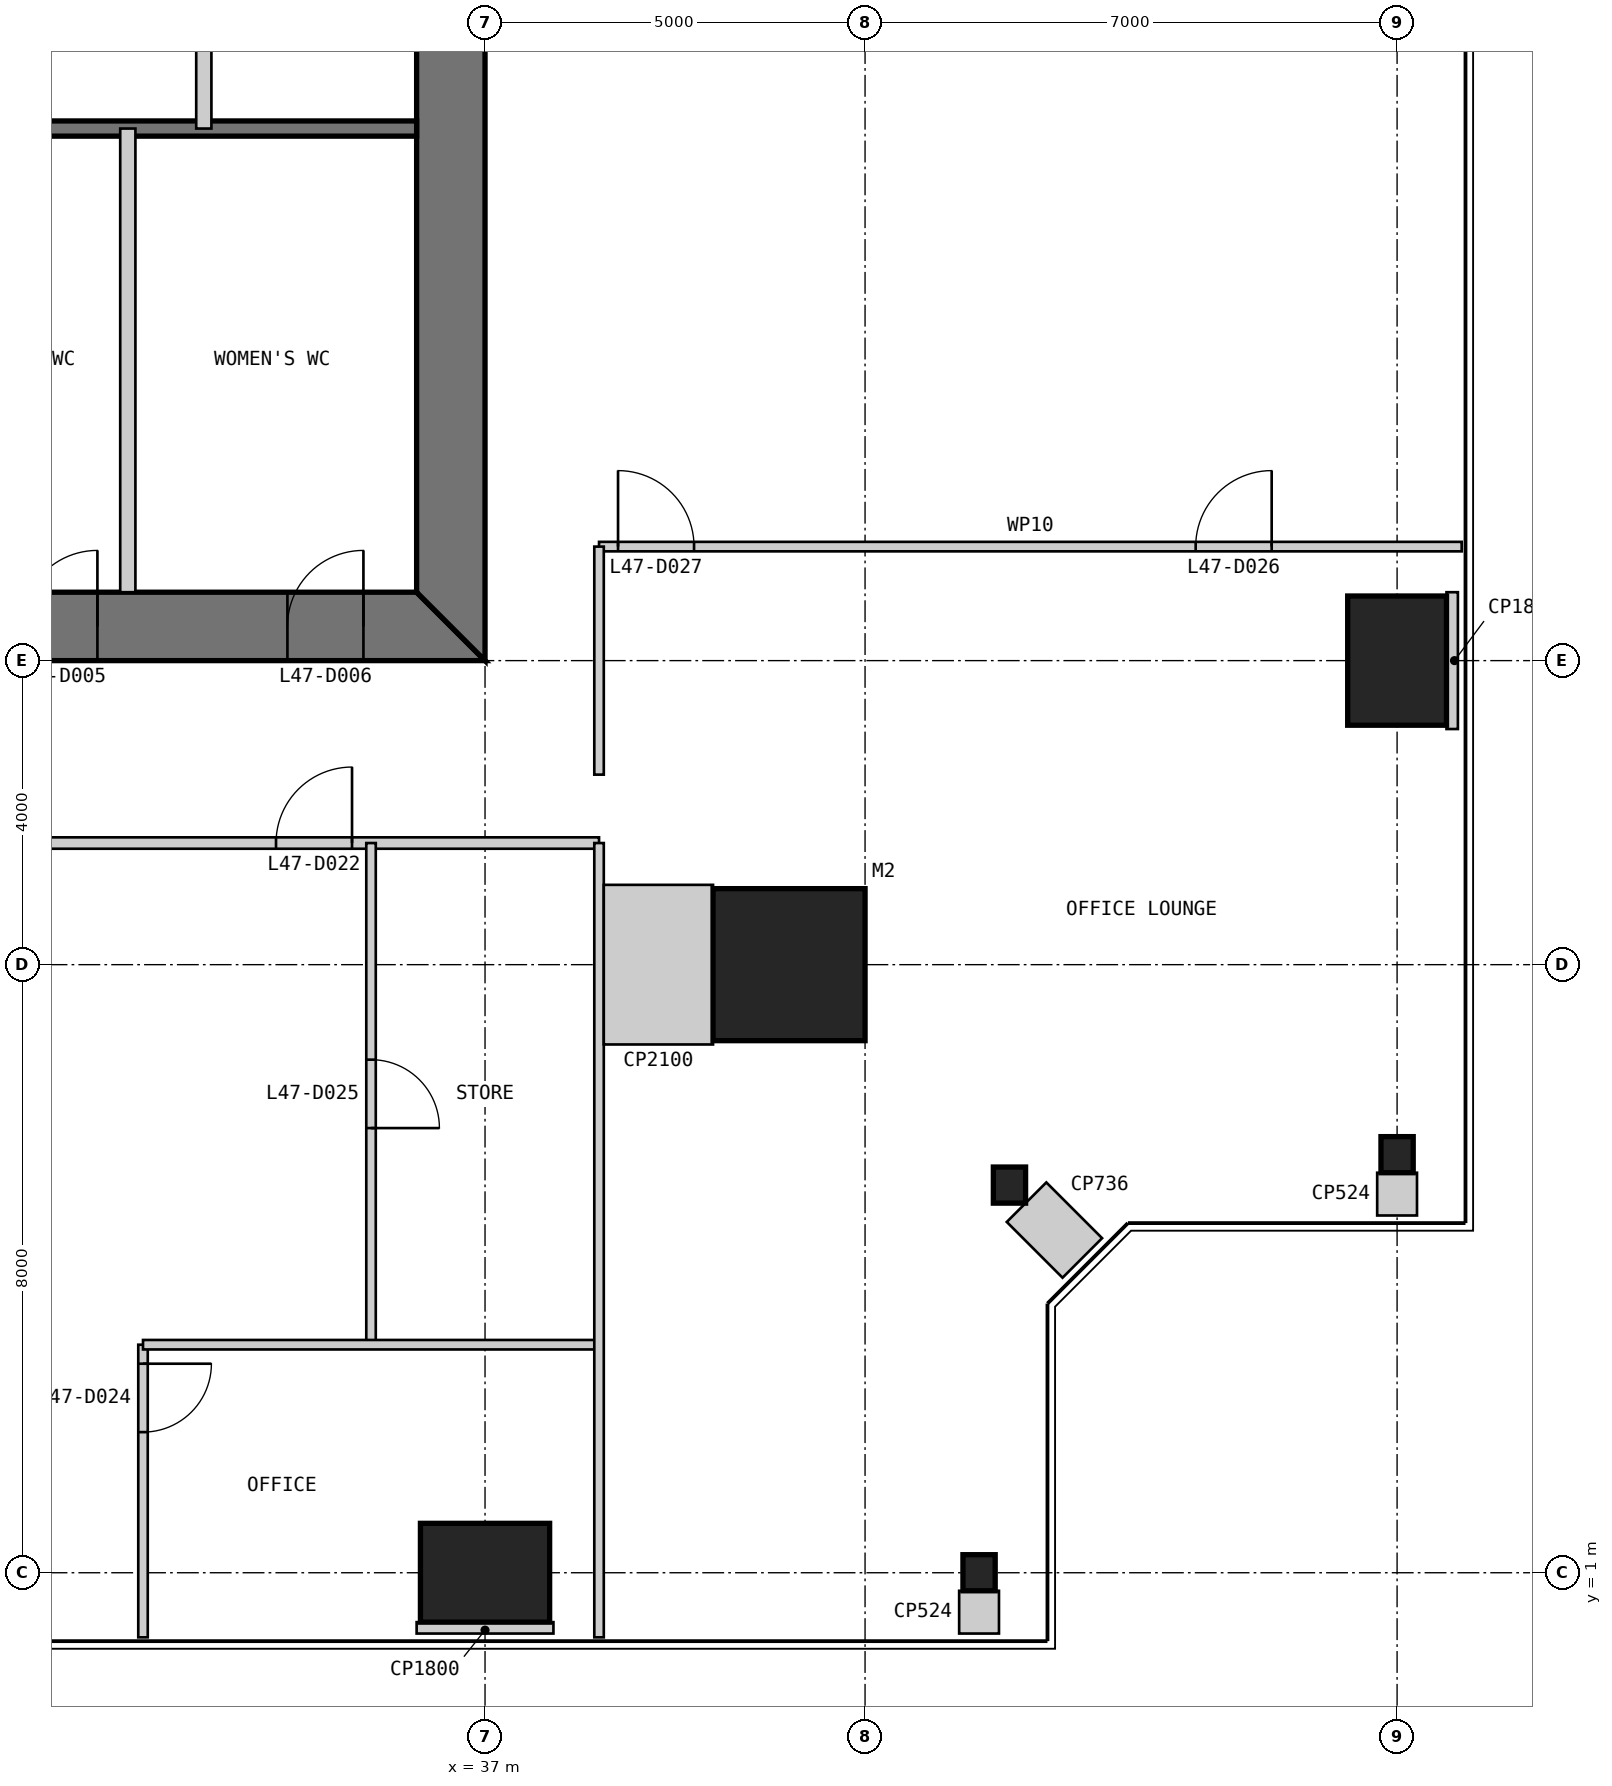
"""IFC4 building model, lengths in metres.
Left out: names, types, materials, properties, quantities, classifications, styles, units other than length and angle.
Written with IfcOpenShell. Run it as: python <this file> out.ifc"""

import sys

from ifc_helpers import new_model, si_unit, direction, frame, frame_2d, origin, origin_2d, place, context, subcontext, project, spatial, polyline, rectangle, i_section, outline, extrude, element, fill, save


model = new_model("IFC4")
c1 = context("Model", 3, precision=1e-05, world=origin(), true_north=direction((0.0, 1.0)))
c2 = subcontext(c1, "Body", "Model", "MODEL_VIEW")
j1 = project(units=[si_unit("LENGTHUNIT", "METRE"), si_unit("PLANEANGLEUNIT", "RADIAN")], contexts=[c1])
p1 = place(None, origin())
s1 = spatial("IfcSite", under=j1, at=p1, CompositionType="ELEMENT")
p2 = place(p1, origin())
s2 = spatial("IfcBuilding", under=s1, at=p2, CompositionType="ELEMENT")
p3 = place(p2, frame((0.0, 0.0, 201.8)))
s3 = spatial("IfcBuildingStorey", under=s2, at=p3, CompositionType="ELEMENT", Elevation=201.8)
p4 = place(p3, frame((41.0, 9.0, 0.0), z_axis=(0.0, 0.0, 1.0), x_axis=(1.0, 0.0, 0.0)))
e1 = element("IfcColumn", 1, at=p4, inside=s3, PredefinedType="COLUMN", context=c2, shape_type="SweptSolid", body=[
    extrude(rectangle(XDim=2.0, YDim=2.0, at=origin_2d()), origin(), (0.0, 0.0, 1.0), 4.0),
])
p5 = place(p3, frame((37.0, 1.0, 0.0), z_axis=(0.0, 0.0, 1.0), x_axis=(1.0, 0.0, 0.0)))
e2 = element("IfcColumn", 2, at=p5, inside=s3, PredefinedType="COLUMN", context=c2, shape_type="SweptSolid", body=[
    extrude(rectangle(XDim=1.7, YDim=1.3, at=origin_2d()), origin(), (0.0, 0.0, 1.0), 4.0),
])
for number, where, z_axis, x_axis in (
    (3, (43.5, 1.0, 0.0), (0.0, 0.0, 1.0), (1.0, 0.0, 0.0)),
    (4, (43.9, 6.1, 0.0), (0.0, 0.0, 1.0), (1.0, 0.0, 0.0)),
    (5, (49.0, 6.5, 0.0), (0.0, 0.0, 1.0), (1.0, 0.0, 0.0)),
):
    element("IfcColumn", number, at=place(p3, frame(where, z_axis=z_axis, x_axis=x_axis)), inside=s3, PredefinedType="COLUMN", context=c2, shape_type="SweptSolid", body=[
        extrude(i_section(OverallWidth=0.424, OverallDepth=0.475, WebThickness=0.048, FlangeThickness=0.077, at=origin_2d()), origin(), (0.0, 0.0, 1.0), 4.0),
    ])
p6 = place(p3, frame((49.0, 13.0, 0.0), z_axis=(0.0, 0.0, 1.0), x_axis=(1.0, 0.0, 0.0)))
e6 = element("IfcColumn", 6, at=p6, inside=s3, PredefinedType="COLUMN", context=c2, shape_type="SweptSolid", body=[
    extrude(rectangle(XDim=1.3, YDim=1.7, at=origin_2d()), origin(), (0.0, 0.0, 1.0), 4.0),
])
p7 = place(p3, frame((13.0, 13.45, 0.0), z_axis=(0.0, 0.0, 1.0), x_axis=(1.0, 0.0, 0.0)))
e7 = element("IfcWall", 7, at=p7, inside=s3, PredefinedType="SHEAR", context=c2, shape_type="SweptSolid", body=[
    extrude(outline(polyline([(0.0, -0.45), (24.0, -0.45), (23.1, 0.45), (0.9, 0.45), (0.0, -0.45)])), origin(), (0.0, 0.0, 1.0), 4.0),
])
p8 = place(p7, frame((4.9, 0.0, 0.0)))
e8 = element("IfcOpeningElement", 8, at=p8, cuts=e7, PredefinedType="OPENING", context=c2, shape_type="SweptSolid", body=[
    extrude(rectangle(XDim=1.0, YDim=2.2, at=frame_2d((0.5, 1.1))), frame((0.0, 0.46, 0.0), z_axis=(0.0, -1.0, 0.0), x_axis=(1.0, 0.0, 0.0)), (0.0, 0.0, 1.0), 0.92),
])
p9 = place(p7, frame((8.9, 0.0, 0.0)))
e9 = element("IfcOpeningElement", 9, at=p9, cuts=e7, PredefinedType="OPENING", context=c2, shape_type="SweptSolid", body=[
    extrude(rectangle(XDim=1.1, YDim=2.2, at=frame_2d((0.55, 1.1))), frame((0.0, 0.46, 0.0), z_axis=(0.0, -1.0, 0.0), x_axis=(1.0, 0.0, 0.0)), (0.0, 0.0, 1.0), 0.92),
])
p10 = place(p7, frame((15.05, 0.0, 0.0)))
e10 = element("IfcOpeningElement", 10, at=p10, cuts=e7, PredefinedType="OPENING", context=c2, shape_type="SweptSolid", body=[
    extrude(rectangle(XDim=0.9, YDim=2.2, at=frame_2d((0.45, 1.1))), frame((0.0, 0.46, 0.0), z_axis=(0.0, -1.0, 0.0), x_axis=(1.0, 0.0, 0.0)), (0.0, 0.0, 1.0), 0.92),
])
p11 = place(p7, frame((17.9, 0.0, 0.0)))
e11 = element("IfcOpeningElement", 11, at=p11, cuts=e7, PredefinedType="OPENING", context=c2, shape_type="SweptSolid", body=[
    extrude(rectangle(XDim=1.0, YDim=2.2, at=frame_2d((0.5, 1.1))), frame((0.0, 0.46, 0.0), z_axis=(0.0, -1.0, 0.0), x_axis=(1.0, 0.0, 0.0)), (0.0, 0.0, 1.0), 0.92),
])
p12 = place(p7, frame((21.4, 0.0, 0.0)))
e12 = element("IfcOpeningElement", 12, at=p12, cuts=e7, PredefinedType="OPENING", context=c2, shape_type="SweptSolid", body=[
    extrude(rectangle(XDim=1.0, YDim=2.2, at=frame_2d((0.5, 1.1))), frame((0.0, 0.46, 0.0), z_axis=(0.0, -1.0, 0.0), x_axis=(1.0, 0.0, 0.0)), (0.0, 0.0, 1.0), 0.92),
])
p13 = place(p3, frame((36.55, 13.9, 0.0), z_axis=(0.0, 0.0, 1.0), x_axis=(0.0, 1.0, 0.0)))
e13 = element("IfcWall", 13, at=p13, inside=s3, PredefinedType="SHEAR", context=c2, shape_type="SweptSolid", body=[
    extrude(outline(polyline([(-0.9, -0.45), (23.1, -0.45), (22.2, 0.45), (0.0, 0.45), (-0.9, -0.45)])), origin(), (0.0, 0.0, 1.0), 4.0),
])
p14 = place(p13, frame((20.2, 0.0, 0.0)))
e14 = element("IfcOpeningElement", 14, at=p14, cuts=e13, PredefinedType="OPENING", context=c2, shape_type="SweptSolid", body=[
    extrude(rectangle(XDim=1.0, YDim=2.2, at=frame_2d((0.5, 1.1))), frame((0.0, 0.46, 0.0), z_axis=(0.0, -1.0, 0.0), x_axis=(1.0, 0.0, 0.0)), (0.0, 0.0, 1.0), 0.92),
])
p15 = place(p13, frame((17.25, 0.0, 0.0)))
e15 = element("IfcOpeningElement", 15, at=p15, cuts=e13, PredefinedType="OPENING", context=c2, shape_type="SweptSolid", body=[
    extrude(rectangle(XDim=0.9, YDim=2.2, at=frame_2d((0.45, 1.1))), frame((0.0, 0.46, 0.0), z_axis=(0.0, -1.0, 0.0), x_axis=(1.0, 0.0, 0.0)), (0.0, 0.0, 1.0), 0.92),
])
p16 = place(p3, frame((20.3, 20.0, 0.0), z_axis=(0.0, 0.0, 1.0), x_axis=(1.0, 0.0, 0.0)))
e16 = element("IfcWall", 16, at=p16, inside=s3, PredefinedType="SOLIDWALL", context=c2, shape_type="SweptSolid", body=[
    extrude(rectangle(XDim=15.8, YDim=0.2, at=frame_2d((7.9, 0.0))), origin(), (0.0, 0.0, 1.0), 3.8),
])
p17 = place(p3, frame((32.3, 13.9, 0.0), z_axis=(0.0, 0.0, 1.0), x_axis=(0.0, 1.0, 0.0)))
e17 = element("IfcWall", 17, at=p17, inside=s3, PredefinedType="PARTITIONING", context=c2, shape_type="SweptSolid", body=[
    extrude(rectangle(XDim=6.1, YDim=0.2, at=frame_2d((3.05, 0.0))), origin(), (0.0, 0.0, 1.0), 3.8),
])
p18 = place(p3, frame((33.3, 36.1, 0.0), z_axis=(0.0, 0.0, 1.0), x_axis=(0.0, -1.0, 0.0)))
e18 = element("IfcWall", 18, at=p18, inside=s3, PredefinedType="PARTITIONING", context=c2, shape_type="SweptSolid", body=[
    extrude(rectangle(XDim=16.1, YDim=0.2, at=frame_2d((8.05, 0.0))), origin(), (0.0, 0.0, 1.0), 3.8),
])
p19 = place(p3, frame((11.5, 10.6, 0.0), z_axis=(0.0, 0.0, 1.0), x_axis=(1.0, 0.0, 0.0)))
e19 = element("IfcWall", 19, at=p19, inside=s3, PredefinedType="PARTITIONING", context=c2, shape_type="SweptSolid", body=[
    extrude(rectangle(XDim=27.0, YDim=0.15, at=frame_2d((13.5, 0.0))), origin(), (0.0, 0.0, 1.0), 3.85),
])
p20 = place(p19, frame((0.25, 0.0, 0.0)))
e20 = element("IfcOpeningElement", 20, at=p20, cuts=e19, PredefinedType="OPENING", context=c2, shape_type="SweptSolid", body=[
    extrude(rectangle(XDim=1.0, YDim=2.2, at=frame_2d((0.5, 1.1))), frame((0.0, 0.085, 0.0), z_axis=(0.0, -1.0, 0.0), x_axis=(1.0, 0.0, 0.0)), (0.0, 0.0, 1.0), 0.17),
])
p21 = place(p19, frame((22.75, 0.0, 0.0)))
e21 = element("IfcOpeningElement", 21, at=p21, cuts=e19, PredefinedType="OPENING", context=c2, shape_type="SweptSolid", body=[
    extrude(rectangle(XDim=1.0, YDim=2.2, at=frame_2d((0.5, 1.1))), frame((0.0, 0.085, 0.0), z_axis=(0.0, -1.0, 0.0), x_axis=(1.0, 0.0, 0.0)), (0.0, 0.0, 1.0), 0.17),
])
p22 = place(p3, frame((32.5, 0.15, 0.0), z_axis=(0.0, 0.0, 1.0), x_axis=(0.0, 1.0, 0.0)))
e22 = element("IfcWall", 22, at=p22, inside=s3, PredefinedType="PARTITIONING", context=c2, shape_type="SweptSolid", body=[
    extrude(rectangle(XDim=3.85, YDim=0.125, at=frame_2d((1.925, 0.0))), origin(), (0.0, 0.0, 1.0), 3.85),
])
p23 = place(p22, frame((2.7, 0.0, 0.0)))
e23 = element("IfcOpeningElement", 23, at=p23, cuts=e22, PredefinedType="OPENING", context=c2, shape_type="SweptSolid", body=[
    extrude(rectangle(XDim=0.9, YDim=2.2, at=frame_2d((0.45, 1.1))), frame((0.0, 0.073, 0.0), z_axis=(0.0, -1.0, 0.0), x_axis=(1.0, 0.0, 0.0)), (0.0, 0.0, 1.0), 0.145),
])
p24 = place(p3, frame((35.5, 4.0, 0.0), z_axis=(0.0, 0.0, 1.0), x_axis=(0.0, 1.0, 0.0)))
e24 = element("IfcWall", 24, at=p24, inside=s3, PredefinedType="PARTITIONING", context=c2, shape_type="SweptSolid", body=[
    extrude(rectangle(XDim=6.6, YDim=0.125, at=frame_2d((3.3, 0.0))), origin(), (0.0, 0.0, 1.0), 3.85),
])
p25 = place(p24, frame((2.85, 0.0, 0.0)))
e25 = element("IfcOpeningElement", 25, at=p25, cuts=e24, PredefinedType="OPENING", context=c2, shape_type="SweptSolid", body=[
    extrude(rectangle(XDim=0.9, YDim=2.2, at=frame_2d((0.45, 1.1))), frame((0.0, 0.073, 0.0), z_axis=(0.0, -1.0, 0.0), x_axis=(1.0, 0.0, 0.0)), (0.0, 0.0, 1.0), 0.145),
])
p26 = place(p3, frame((32.5, 4.0, 0.0), z_axis=(0.0, 0.0, 1.0), x_axis=(1.0, 0.0, 0.0)))
e26 = element("IfcWall", 26, at=p26, inside=s3, PredefinedType="PARTITIONING", context=c2, shape_type="SweptSolid", body=[
    extrude(rectangle(XDim=6.0, YDim=0.125, at=frame_2d((3.0, 0.0))), origin(), (0.0, 0.0, 1.0), 3.85),
])
p27 = place(p3, frame((38.5, 0.15, 0.0), z_axis=(0.0, 0.0, 1.0), x_axis=(0.0, 1.0, 0.0)))
e27 = element("IfcWall", 27, at=p27, inside=s3, PredefinedType="PARTITIONING", context=c2, shape_type="SweptSolid", body=[
    extrude(rectangle(XDim=10.45, YDim=0.125, at=frame_2d((5.225, 0.0))), origin(), (0.0, 0.0, 1.0), 3.85),
])
p28 = place(p3, frame((49.85, 14.5, 0.0), z_axis=(0.0, 0.0, 1.0), x_axis=(-1.0, 0.0, 0.0)))
e28 = element("IfcWall", 28, at=p28, inside=s3, PredefinedType="PARTITIONING", context=c2, shape_type="SweptSolid", body=[
    extrude(rectangle(XDim=11.35, YDim=0.125, at=frame_2d((5.675, 0.0))), origin(), (0.0, 0.0, 1.0), 3.85),
])
p29 = place(p28, frame((2.5, 0.0, 0.0)))
e29 = element("IfcOpeningElement", 29, at=p29, cuts=e28, PredefinedType="OPENING", context=c2, shape_type="SweptSolid", body=[
    extrude(rectangle(XDim=1.0, YDim=2.2, at=frame_2d((0.5, 1.1))), frame((0.0, 0.073, 0.0), z_axis=(0.0, -1.0, 0.0), x_axis=(1.0, 0.0, 0.0)), (0.0, 0.0, 1.0), 0.145),
])
p30 = place(p28, frame((10.1, 0.0, 0.0)))
e30 = element("IfcOpeningElement", 30, at=p30, cuts=e28, PredefinedType="OPENING", context=c2, shape_type="SweptSolid", body=[
    extrude(rectangle(XDim=1.0, YDim=2.2, at=frame_2d((0.5, 1.1))), frame((0.0, 0.073, 0.0), z_axis=(0.0, -1.0, 0.0), x_axis=(1.0, 0.0, 0.0)), (0.0, 0.0, 1.0), 0.145),
])
p31 = place(p3, frame((38.5, 11.5, 0.0), z_axis=(0.0, 0.0, 1.0), x_axis=(0.0, 1.0, 0.0)))
e31 = element("IfcWall", 31, at=p31, inside=s3, PredefinedType="PARTITIONING", context=c2, shape_type="SweptSolid", body=[
    extrude(rectangle(XDim=3.0, YDim=0.125, at=frame_2d((1.5, 0.0))), origin(), (0.0, 0.0, 1.0), 3.85),
])
p32 = place(p3, frame((37.0, 0.2, 0.0), z_axis=(0.0, 0.0, 1.0), x_axis=(0.0, 1.0, 0.0)))
e32 = element("IfcWall", 32, at=p32, inside=s3, PredefinedType="PARTITIONING", context=c2, shape_type="SweptSolid", body=[
    extrude(rectangle(XDim=0.15, YDim=1.8, at=frame_2d((0.075, 0.0))), origin(), (0.0, 0.0, 1.0), 3.85),
])
p33 = place(p3, frame((38.562, 9.0, 0.0), z_axis=(0.0, 0.0, 1.0), x_axis=(1.0, 0.0, 0.0)))
e33 = element("IfcWall", 33, at=p33, inside=s3, PredefinedType="PARTITIONING", context=c2, shape_type="SweptSolid", body=[
    extrude(rectangle(XDim=1.438, YDim=2.1, at=frame_2d((0.719, 0.0))), origin(), (0.0, 0.0, 1.0), 3.85),
])
p34 = place(p3, frame((43.5, 0.2, 0.0), z_axis=(0.0, 0.0, 1.0), x_axis=(0.0, 1.0, 0.0)))
e34 = element("IfcWall", 34, at=p34, inside=s3, PredefinedType="PARTITIONING", context=c2, shape_type="SweptSolid", body=[
    extrude(rectangle(XDim=0.562, YDim=0.524, at=frame_2d((0.281, 0.0))), origin(), (0.0, 0.0, 1.0), 3.85),
])
p35 = place(p3, frame((44.859, 5.141, 0.0), z_axis=(0.0, 0.0, 1.0), x_axis=(-0.707106781187, 0.707106781187, 0.0)))
e35 = element("IfcWall", 35, at=p35, inside=s3, PredefinedType="PARTITIONING", context=c2, shape_type="SweptSolid", body=[
    extrude(rectangle(XDim=1.038, YDim=0.736, at=frame_2d((0.519, 0.0))), origin(), (0.0, 0.0, 1.0), 3.85),
])
p36 = place(p3, frame((49.0, 5.7, 0.0), z_axis=(0.0, 0.0, 1.0), x_axis=(0.0, 1.0, 0.0)))
e36 = element("IfcWall", 36, at=p36, inside=s3, PredefinedType="PARTITIONING", context=c2, shape_type="SweptSolid", body=[
    extrude(rectangle(XDim=0.562, YDim=0.524, at=frame_2d((0.281, 0.0))), origin(), (0.0, 0.0, 1.0), 3.85),
])
p37 = place(p3, frame((49.8, 13.0, 0.0), z_axis=(0.0, 0.0, 1.0), x_axis=(-1.0, 0.0, 0.0)))
e37 = element("IfcWall", 37, at=p37, inside=s3, PredefinedType="PARTITIONING", context=c2, shape_type="SweptSolid", body=[
    extrude(rectangle(XDim=0.15, YDim=1.8, at=frame_2d((0.075, 0.0))), origin(), (0.0, 0.0, 1.0), 3.85),
])
p38 = place(p11, origin())
e38 = element("IfcDoor", 38, at=p38, inside=s3, OperationType="SINGLE_SWING_RIGHT", PredefinedType="DOOR", context=c2, shape_type="SweptSolid", body=[
    extrude(rectangle(XDim=1.0, YDim=2.2, at=frame_2d((0.5, 1.1))), frame((0.0, 0.025, 0.0), z_axis=(0.0, -1.0, 0.0), x_axis=(1.0, 0.0, 0.0)), (0.0, 0.0, 1.0), 0.05),
    extrude(outline(polyline([(0.0, 0.0), (0.04, 0.0), (0.04, 2.16), (0.96, 2.16), (0.96, 0.0), (1.0, 0.0), (1.0, 2.2), (0.0, 2.2), (0.0, 0.0)])), frame((0.0, 0.3, 0.0), z_axis=(0.0, -1.0, 0.0), x_axis=(1.0, 0.0, 0.0)), (0.0, 0.0, 1.0), 0.6),
])
fill(e11, e38)
p39 = place(p12, origin())
e39 = element("IfcDoor", 39, at=p39, inside=s3, OperationType="SINGLE_SWING_RIGHT", PredefinedType="DOOR", context=c2, shape_type="SweptSolid", body=[
    extrude(rectangle(XDim=1.0, YDim=2.2, at=frame_2d((0.5, 1.1))), frame((0.0, 0.025, 0.0), z_axis=(0.0, -1.0, 0.0), x_axis=(1.0, 0.0, 0.0)), (0.0, 0.0, 1.0), 0.05),
    extrude(outline(polyline([(0.0, 0.0), (0.04, 0.0), (0.04, 2.16), (0.96, 2.16), (0.96, 0.0), (1.0, 0.0), (1.0, 2.2), (0.0, 2.2), (0.0, 0.0)])), frame((0.0, 0.3, 0.0), z_axis=(0.0, -1.0, 0.0), x_axis=(1.0, 0.0, 0.0)), (0.0, 0.0, 1.0), 0.6),
])
fill(e12, e39)
p40 = place(p21, origin())
e40 = element("IfcDoor", 40, at=p40, inside=s3, OperationType="SINGLE_SWING_RIGHT", PredefinedType="DOOR", context=c2, shape_type="SweptSolid", body=[
    extrude(rectangle(XDim=1.0, YDim=2.2, at=frame_2d((0.5, 1.1))), frame((0.0, 0.025, 0.0), z_axis=(0.0, -1.0, 0.0), x_axis=(1.0, 0.0, 0.0)), (0.0, 0.0, 1.0), 0.05),
])
fill(e21, e40)
p41 = place(p23, frame((0.9, 0.0, 0.0), z_axis=(0.0, 0.0, 1.0), x_axis=(-1.0, 0.0, 0.0)))
e41 = element("IfcDoor", 41, at=p41, inside=s3, OperationType="SINGLE_SWING_LEFT", PredefinedType="DOOR", context=c2, shape_type="SweptSolid", body=[
    extrude(rectangle(XDim=0.9, YDim=2.2, at=frame_2d((0.45, 1.1))), frame((0.0, 0.025, 0.0), z_axis=(0.0, -1.0, 0.0), x_axis=(1.0, 0.0, 0.0)), (0.0, 0.0, 1.0), 0.05),
])
fill(e23, e41)
p42 = place(p25, frame((0.9, 0.0, 0.0), z_axis=(0.0, 0.0, 1.0), x_axis=(-1.0, 0.0, 0.0)))
e42 = element("IfcDoor", 42, at=p42, inside=s3, OperationType="SINGLE_SWING_RIGHT", PredefinedType="DOOR", context=c2, shape_type="SweptSolid", body=[
    extrude(rectangle(XDim=0.9, YDim=2.2, at=frame_2d((0.45, 1.1))), frame((0.0, 0.025, 0.0), z_axis=(0.0, -1.0, 0.0), x_axis=(1.0, 0.0, 0.0)), (0.0, 0.0, 1.0), 0.05),
])
fill(e25, e42)
p43 = place(p29, frame((1.0, 0.0, 0.0), z_axis=(0.0, 0.0, 1.0), x_axis=(-1.0, 0.0, 0.0)))
e43 = element("IfcDoor", 43, at=p43, inside=s3, OperationType="SINGLE_SWING_RIGHT", PredefinedType="DOOR", context=c2, shape_type="SweptSolid", body=[
    extrude(rectangle(XDim=1.0, YDim=2.2, at=frame_2d((0.5, 1.1))), frame((0.0, 0.025, 0.0), z_axis=(0.0, -1.0, 0.0), x_axis=(1.0, 0.0, 0.0)), (0.0, 0.0, 1.0), 0.05),
])
fill(e29, e43)
p44 = place(p30, frame((1.0, 0.0, 0.0), z_axis=(0.0, 0.0, 1.0), x_axis=(-1.0, 0.0, 0.0)))
e44 = element("IfcDoor", 44, at=p44, inside=s3, OperationType="SINGLE_SWING_LEFT", PredefinedType="DOOR", context=c2, shape_type="SweptSolid", body=[
    extrude(rectangle(XDim=1.0, YDim=2.2, at=frame_2d((0.5, 1.1))), frame((0.0, 0.025, 0.0), z_axis=(0.0, -1.0, 0.0), x_axis=(1.0, 0.0, 0.0)), (0.0, 0.0, 1.0), 0.05),
])
fill(e30, e44)
save(model, sys.argv[1])
